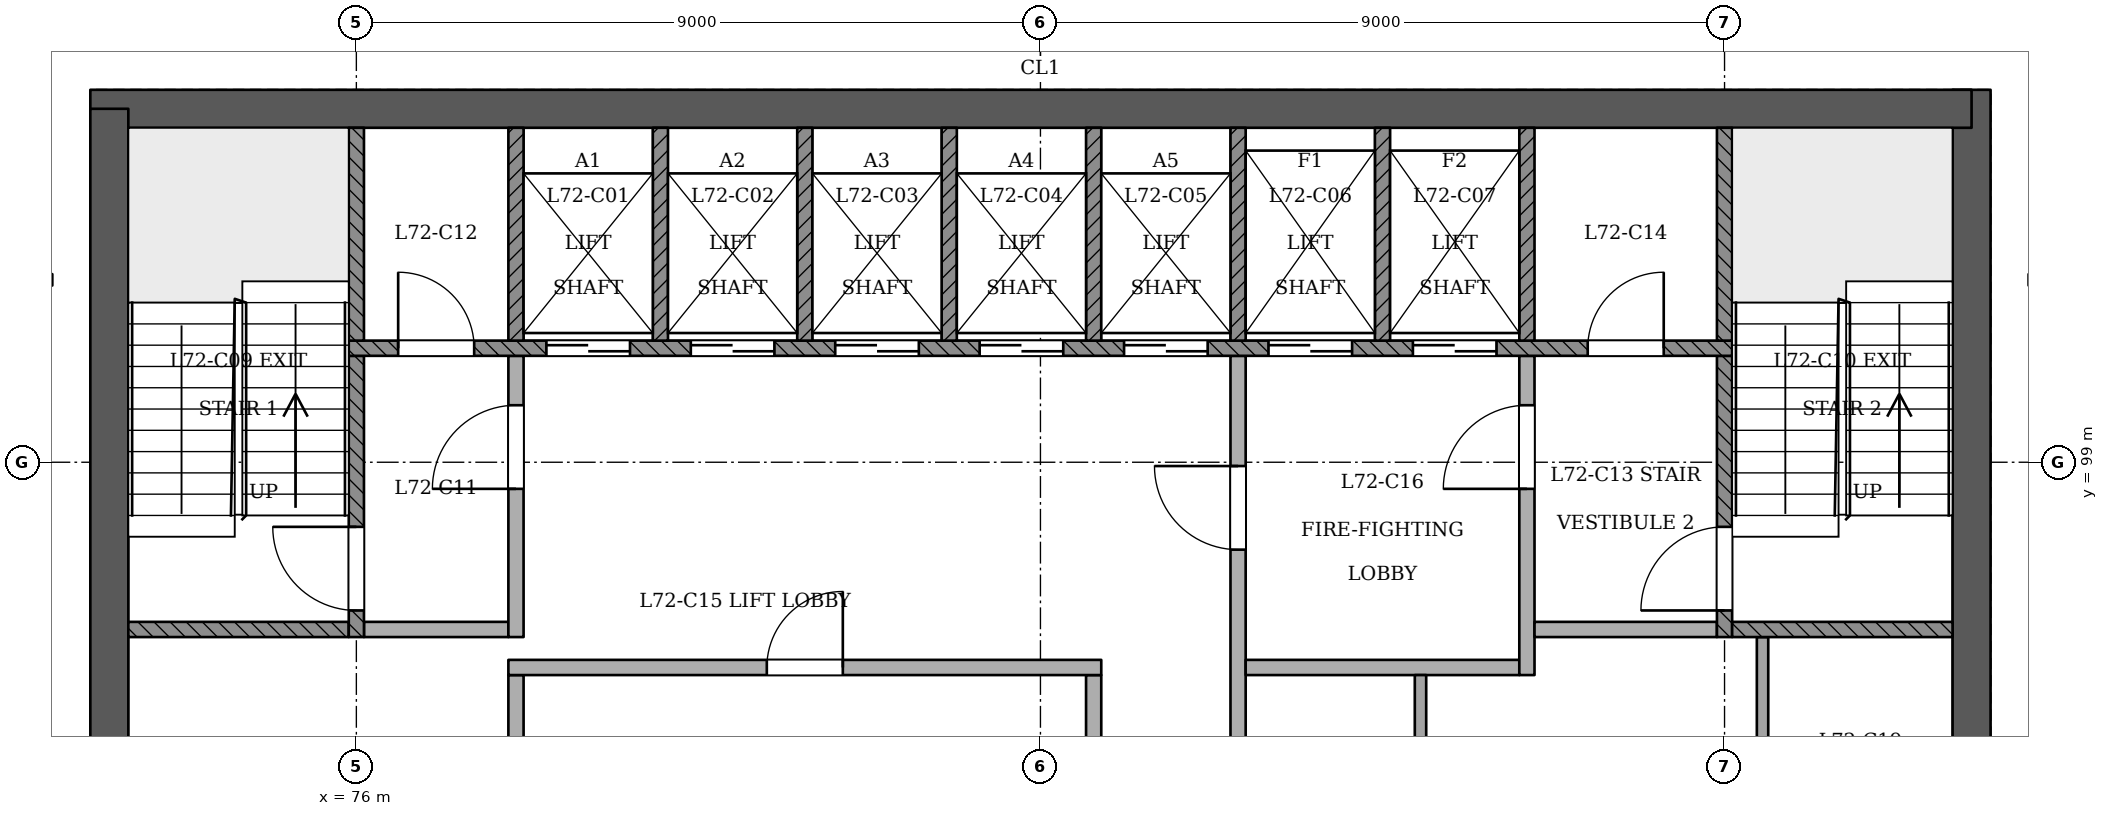
"""IFC4 building model, lengths in metres.
Left out: names, types, materials, properties, quantities, classifications, styles, units other than length and angle.
Written with IfcOpenShell. Run it as: python <this file> out.ifc"""

import sys

from ifc_helpers import new_model, si_unit, direction, frame, frame_2d, origin, place, context, subcontext, project, spatial, rectangle, extrude, element, fill, save


model = new_model("IFC4")
c1 = context("Model", 3, precision=1e-05, world=origin(), true_north=direction((0.0, 1.0)))
c2 = subcontext(c1, "Body", "Model", "MODEL_VIEW")
j1 = project(units=[si_unit("LENGTHUNIT", "METRE"), si_unit("PLANEANGLEUNIT", "RADIAN")], contexts=[c1])
p1 = place(None, origin())
s1 = spatial("IfcSite", under=j1, at=p1, CompositionType="ELEMENT")
p2 = place(p1, origin())
s2 = spatial("IfcBuilding", under=s1, at=p2, CompositionType="ELEMENT")
p3 = place(p2, frame((0.0, 0.0, 278.8)))
s3 = spatial("IfcBuildingStorey", under=s2, at=p3, CompositionType="ELEMENT", Elevation=278.8)
p4 = place(p3, frame((97.25, 93.15, 0.0), z_axis=(0.0, 0.0, 1.0), x_axis=(0.0, 1.0, 0.0)))
e1 = element("IfcWall", 1, at=p4, inside=s3, PredefinedType="SHEAR", context=c2, shape_type="SweptSolid", body=[
    extrude(rectangle(XDim=10.75, YDim=0.5, at=frame_2d((5.375, 0.0))), origin(), (0.0, 0.0, 1.0), 3.6),
])
p5 = place(p3, frame((97.25, 103.65, 0.0), z_axis=(0.0, 0.0, 1.0), x_axis=(-1.0, 0.0, 0.0)))
e2 = element("IfcWall", 2, at=p5, inside=s3, PredefinedType="SHEAR", context=c2, shape_type="SweptSolid", body=[
    extrude(rectangle(XDim=24.75, YDim=0.5, at=frame_2d((12.375, 0.0))), origin(), (0.0, 0.0, 1.0), 3.6),
])
p6 = place(p3, frame((72.75, 103.65, 0.0), z_axis=(0.0, 0.0, 1.0), x_axis=(0.0, -1.0, 0.0)))
e3 = element("IfcWall", 3, at=p6, inside=s3, PredefinedType="SHEAR", context=c2, shape_type="SweptSolid", body=[
    extrude(rectangle(XDim=10.75, YDim=0.5, at=frame_2d((5.375, 0.0))), origin(), (0.0, 0.0, 1.0), 3.6),
])
p7 = place(p3, frame((72.0, 101.4, 0.0), z_axis=(0.0, 0.0, 1.0), x_axis=(-1.0, 0.0, 0.0)))
e4 = element("IfcWall", 4, at=p7, inside=s3, PredefinedType="PARTITIONING", context=c2, shape_type="SweptSolid", body=[
    extrude(rectangle(XDim=1.8, YDim=0.15, at=frame_2d((0.9, 0.0))), origin(), (0.0, 0.0, 1.0), 3.2),
])
p8 = place(p7, frame((0.504, 0.0, 0.0)))
e5 = element("IfcOpeningElement", 5, at=p8, cuts=e4, PredefinedType="OPENING", context=c2, shape_type="SweptSolid", body=[
    extrude(rectangle(XDim=1.0, YDim=2.1, at=frame_2d((0.5, 1.05))), frame((0.0, 0.085, 0.0), z_axis=(0.0, -1.0, 0.0), x_axis=(1.0, 0.0, 0.0)), (0.0, 0.0, 1.0), 0.171),
])
for number, where, z_axis, x_axis in (
    (6, (78.1, 93.4, 0.0), (0.0, 0.0, 1.0), (0.0, 1.0, 0.0)),
    (7, (85.7, 93.4, 0.0), (0.0, 0.0, 1.0), (0.0, 1.0, 0.0)),
):
    element("IfcWall", number, at=place(p3, frame(where, z_axis=z_axis, x_axis=x_axis)), inside=s3, PredefinedType="PARTITIONING", context=c2, shape_type="SweptSolid", body=[
        extrude(rectangle(XDim=2.8, YDim=0.2, at=frame_2d((1.4, 0.0))), origin(), (0.0, 0.0, 1.0), 3.2),
    ])
p9 = place(p3, frame((87.6, 93.4, 0.0), z_axis=(0.0, 0.0, 1.0), x_axis=(0.0, 1.0, 0.0)))
e8 = element("IfcWall", 8, at=p9, inside=s3, PredefinedType="PARTITIONING", context=c2, shape_type="SweptSolid", body=[
    extrude(rectangle(XDim=7.0, YDim=0.2, at=frame_2d((3.5, 0.0))), origin(), (0.0, 0.0, 1.0), 3.2),
])
p10 = place(p9, frame((4.45, 0.0, 0.0)))
e9 = element("IfcOpeningElement", 9, at=p10, cuts=e8, PredefinedType="OPENING", context=c2, shape_type="SweptSolid", body=[
    extrude(rectangle(XDim=1.1, YDim=2.1, at=frame_2d((0.55, 1.05))), frame((0.0, 0.11, 0.0), z_axis=(0.0, -1.0, 0.0), x_axis=(1.0, 0.0, 0.0)), (0.0, 0.0, 1.0), 0.221),
])
p11 = place(p3, frame((90.0, 93.4, 0.0), z_axis=(0.0, 0.0, 1.0), x_axis=(0.0, 1.0, 0.0)))
e10 = element("IfcWall", 10, at=p11, inside=s3, PredefinedType="PARTITIONING", context=c2, shape_type="SweptSolid", body=[
    extrude(rectangle(XDim=2.8, YDim=0.15, at=frame_2d((1.4, 0.0))), origin(), (0.0, 0.0, 1.0), 3.2),
])
p12 = place(p3, frame((94.5, 93.4, 0.0), z_axis=(0.0, 0.0, 1.0), x_axis=(0.0, 1.0, 0.0)))
e11 = element("IfcWall", 11, at=p12, inside=s3, PredefinedType="PARTITIONING", context=c2, shape_type="SweptSolid", body=[
    extrude(rectangle(XDim=3.3, YDim=0.15, at=frame_2d((1.65, 0.0))), origin(), (0.0, 0.0, 1.0), 3.2),
])
p13 = place(p3, frame((78.0, 96.3, 0.0), z_axis=(0.0, 0.0, 1.0), x_axis=(1.0, 0.0, 0.0)))
e12 = element("IfcWall", 12, at=p13, inside=s3, PredefinedType="PARTITIONING", context=c2, shape_type="SweptSolid", body=[
    extrude(rectangle(XDim=7.8, YDim=0.2, at=frame_2d((3.9, 0.0))), origin(), (0.0, 0.0, 1.0), 3.2),
])
p14 = place(p13, frame((3.4, 0.0, 0.0)))
e13 = element("IfcOpeningElement", 13, at=p14, cuts=e12, PredefinedType="OPENING", context=c2, shape_type="SweptSolid", body=[
    extrude(rectangle(XDim=1.0, YDim=2.1, at=frame_2d((0.5, 1.05))), frame((0.0, 0.11, 0.0), z_axis=(0.0, -1.0, 0.0), x_axis=(1.0, 0.0, 0.0)), (0.0, 0.0, 1.0), 0.221),
])
p15 = place(p3, frame((87.7, 96.3, 0.0), z_axis=(0.0, 0.0, 1.0), x_axis=(1.0, 0.0, 0.0)))
e14 = element("IfcWall", 14, at=p15, inside=s3, PredefinedType="PARTITIONING", context=c2, shape_type="SweptSolid", body=[
    extrude(rectangle(XDim=3.6, YDim=0.2, at=frame_2d((1.8, 0.0))), origin(), (0.0, 0.0, 1.0), 3.2),
])
p16 = place(p3, frame((91.4, 96.2, 0.0), z_axis=(0.0, 0.0, 1.0), x_axis=(0.0, 1.0, 0.0)))
e15 = element("IfcWall", 15, at=p16, inside=s3, PredefinedType="PARTITIONING", context=c2, shape_type="SweptSolid", body=[
    extrude(rectangle(XDim=4.2, YDim=0.2, at=frame_2d((2.1, 0.0))), origin(), (0.0, 0.0, 1.0), 3.2),
])
p17 = place(p16, frame((2.45, 0.0, 0.0)))
e16 = element("IfcOpeningElement", 16, at=p17, cuts=e15, PredefinedType="OPENING", context=c2, shape_type="SweptSolid", body=[
    extrude(rectangle(XDim=1.1, YDim=2.1, at=frame_2d((0.55, 1.05))), frame((0.0, 0.11, 0.0), z_axis=(0.0, -1.0, 0.0), x_axis=(1.0, 0.0, 0.0)), (0.0, 0.0, 1.0), 0.221),
])
p18 = place(p3, frame((73.0, 96.8, 0.0), z_axis=(0.0, 0.0, 1.0), x_axis=(1.0, 0.0, 0.0)))
e17 = element("IfcWall", 17, at=p18, inside=s3, PredefinedType="SOLIDWALL", context=c2, shape_type="SweptSolid", body=[
    extrude(rectangle(XDim=2.9, YDim=0.2, at=frame_2d((1.45, 0.0))), origin(), (0.0, 0.0, 1.0), 3.2),
])
p19 = place(p3, frame((76.0, 96.7, 0.0), z_axis=(0.0, 0.0, 1.0), x_axis=(0.0, 1.0, 0.0)))
e18 = element("IfcWall", 18, at=p19, inside=s3, PredefinedType="SOLIDWALL", context=c2, shape_type="SweptSolid", body=[
    extrude(rectangle(XDim=3.7, YDim=0.2, at=frame_2d((1.85, 0.0))), origin(), (0.0, 0.0, 1.0), 3.2),
])
p20 = place(p19, frame((0.35, 0.0, 0.0)))
e19 = element("IfcOpeningElement", 19, at=p20, cuts=e18, PredefinedType="OPENING", context=c2, shape_type="SweptSolid", body=[
    extrude(rectangle(XDim=1.1, YDim=2.1, at=frame_2d((0.55, 1.05))), frame((0.0, 0.11, 0.0), z_axis=(0.0, -1.0, 0.0), x_axis=(1.0, 0.0, 0.0)), (0.0, 0.0, 1.0), 0.221),
])
p21 = place(p3, frame((76.1, 96.8, 0.0), z_axis=(0.0, 0.0, 1.0), x_axis=(1.0, 0.0, 0.0)))
e20 = element("IfcWall", 20, at=p21, inside=s3, PredefinedType="PARTITIONING", context=c2, shape_type="SweptSolid", body=[
    extrude(rectangle(XDim=1.9, YDim=0.2, at=frame_2d((0.95, 0.0))), origin(), (0.0, 0.0, 1.0), 3.2),
])
p22 = place(p3, frame((78.1, 96.7, 0.0), z_axis=(0.0, 0.0, 1.0), x_axis=(0.0, 1.0, 0.0)))
e21 = element("IfcWall", 21, at=p22, inside=s3, PredefinedType="PARTITIONING", context=c2, shape_type="SweptSolid", body=[
    extrude(rectangle(XDim=3.7, YDim=0.2, at=frame_2d((1.85, 0.0))), origin(), (0.0, 0.0, 1.0), 3.2),
])
p23 = place(p22, frame((1.95, 0.0, 0.0)))
e22 = element("IfcOpeningElement", 22, at=p23, cuts=e21, PredefinedType="OPENING", context=c2, shape_type="SweptSolid", body=[
    extrude(rectangle(XDim=1.1, YDim=2.1, at=frame_2d((0.55, 1.05))), frame((0.0, 0.11, 0.0), z_axis=(0.0, -1.0, 0.0), x_axis=(1.0, 0.0, 0.0)), (0.0, 0.0, 1.0), 0.221),
])
p24 = place(p3, frame((91.5, 96.8, 0.0), z_axis=(0.0, 0.0, 1.0), x_axis=(1.0, 0.0, 0.0)))
e23 = element("IfcWall", 23, at=p24, inside=s3, PredefinedType="PARTITIONING", context=c2, shape_type="SweptSolid", body=[
    extrude(rectangle(XDim=2.4, YDim=0.2, at=frame_2d((1.2, 0.0))), origin(), (0.0, 0.0, 1.0), 3.2),
])
p25 = place(p3, frame((94.0, 96.7, 0.0), z_axis=(0.0, 0.0, 1.0), x_axis=(0.0, 1.0, 0.0)))
e24 = element("IfcWall", 24, at=p25, inside=s3, PredefinedType="SOLIDWALL", context=c2, shape_type="SweptSolid", body=[
    extrude(rectangle(XDim=3.7, YDim=0.2, at=frame_2d((1.85, 0.0))), origin(), (0.0, 0.0, 1.0), 3.2),
])
p26 = place(p25, frame((0.35, 0.0, 0.0)))
e25 = element("IfcOpeningElement", 25, at=p26, cuts=e24, PredefinedType="OPENING", context=c2, shape_type="SweptSolid", body=[
    extrude(rectangle(XDim=1.1, YDim=2.1, at=frame_2d((0.55, 1.05))), frame((0.0, 0.11, 0.0), z_axis=(0.0, -1.0, 0.0), x_axis=(1.0, 0.0, 0.0)), (0.0, 0.0, 1.0), 0.221),
])
p27 = place(p3, frame((94.1, 96.8, 0.0), z_axis=(0.0, 0.0, 1.0), x_axis=(1.0, 0.0, 0.0)))
e26 = element("IfcWall", 26, at=p27, inside=s3, PredefinedType="SOLIDWALL", context=c2, shape_type="SweptSolid", body=[
    extrude(rectangle(XDim=2.9, YDim=0.2, at=frame_2d((1.45, 0.0))), origin(), (0.0, 0.0, 1.0), 3.2),
])
p28 = place(p3, frame((75.9, 100.5, 0.0), z_axis=(0.0, 0.0, 1.0), x_axis=(1.0, 0.0, 0.0)))
e27 = element("IfcWall", 27, at=p28, inside=s3, PredefinedType="SOLIDWALL", context=c2, shape_type="SweptSolid", body=[
    extrude(rectangle(XDim=18.2, YDim=0.2, at=frame_2d((9.1, 0.0))), origin(), (0.0, 0.0, 1.0), 3.2),
])
p29 = place(p28, frame((2.6, 0.0, 0.0)))
e28 = element("IfcOpeningElement", 28, at=p29, cuts=e27, PredefinedType="OPENING", context=c2, shape_type="SweptSolid", body=[
    extrude(rectangle(XDim=1.1, YDim=2.1, at=frame_2d((0.55, 1.05))), frame((0.0, 0.11, 0.0), z_axis=(0.0, -1.0, 0.0), x_axis=(1.0, 0.0, 0.0)), (0.0, 0.0, 1.0), 0.221),
])
p30 = place(p28, frame((4.5, 0.0, 0.0)))
e29 = element("IfcOpeningElement", 29, at=p30, cuts=e27, PredefinedType="OPENING", context=c2, shape_type="SweptSolid", body=[
    extrude(rectangle(XDim=1.1, YDim=2.1, at=frame_2d((0.55, 1.05))), frame((0.0, 0.11, 0.0), z_axis=(0.0, -1.0, 0.0), x_axis=(1.0, 0.0, 0.0)), (0.0, 0.0, 1.0), 0.221),
])
p31 = place(p28, frame((6.4, 0.0, 0.0)))
e30 = element("IfcOpeningElement", 30, at=p31, cuts=e27, PredefinedType="OPENING", context=c2, shape_type="SweptSolid", body=[
    extrude(rectangle(XDim=1.1, YDim=2.1, at=frame_2d((0.55, 1.05))), frame((0.0, 0.11, 0.0), z_axis=(0.0, -1.0, 0.0), x_axis=(1.0, 0.0, 0.0)), (0.0, 0.0, 1.0), 0.221),
])
p32 = place(p28, frame((8.3, 0.0, 0.0)))
e31 = element("IfcOpeningElement", 31, at=p32, cuts=e27, PredefinedType="OPENING", context=c2, shape_type="SweptSolid", body=[
    extrude(rectangle(XDim=1.1, YDim=2.1, at=frame_2d((0.55, 1.05))), frame((0.0, 0.11, 0.0), z_axis=(0.0, -1.0, 0.0), x_axis=(1.0, 0.0, 0.0)), (0.0, 0.0, 1.0), 0.221),
])
p33 = place(p28, frame((10.2, 0.0, 0.0)))
e32 = element("IfcOpeningElement", 32, at=p33, cuts=e27, PredefinedType="OPENING", context=c2, shape_type="SweptSolid", body=[
    extrude(rectangle(XDim=1.1, YDim=2.1, at=frame_2d((0.55, 1.05))), frame((0.0, 0.11, 0.0), z_axis=(0.0, -1.0, 0.0), x_axis=(1.0, 0.0, 0.0)), (0.0, 0.0, 1.0), 0.221),
])
p34 = place(p28, frame((12.1, 0.0, 0.0)))
e33 = element("IfcOpeningElement", 33, at=p34, cuts=e27, PredefinedType="OPENING", context=c2, shape_type="SweptSolid", body=[
    extrude(rectangle(XDim=1.1, YDim=2.1, at=frame_2d((0.55, 1.05))), frame((0.0, 0.11, 0.0), z_axis=(0.0, -1.0, 0.0), x_axis=(1.0, 0.0, 0.0)), (0.0, 0.0, 1.0), 0.221),
])
p35 = place(p28, frame((14.0, 0.0, 0.0)))
e34 = element("IfcOpeningElement", 34, at=p35, cuts=e27, PredefinedType="OPENING", context=c2, shape_type="SweptSolid", body=[
    extrude(rectangle(XDim=1.1, YDim=2.1, at=frame_2d((0.55, 1.05))), frame((0.0, 0.11, 0.0), z_axis=(0.0, -1.0, 0.0), x_axis=(1.0, 0.0, 0.0)), (0.0, 0.0, 1.0), 0.221),
])
p36 = place(p28, frame((0.65, 0.0, 0.0)))
e35 = element("IfcOpeningElement", 35, at=p36, cuts=e27, PredefinedType="OPENING", context=c2, shape_type="SweptSolid", body=[
    extrude(rectangle(XDim=1.0, YDim=2.1, at=frame_2d((0.5, 1.05))), frame((0.0, 0.11, 0.0), z_axis=(0.0, -1.0, 0.0), x_axis=(1.0, 0.0, 0.0)), (0.0, 0.0, 1.0), 0.221),
])
p37 = place(p28, frame((16.3, 0.0, 0.0)))
e36 = element("IfcOpeningElement", 36, at=p37, cuts=e27, PredefinedType="OPENING", context=c2, shape_type="SweptSolid", body=[
    extrude(rectangle(XDim=1.0, YDim=2.1, at=frame_2d((0.5, 1.05))), frame((0.0, 0.11, 0.0), z_axis=(0.0, -1.0, 0.0), x_axis=(1.0, 0.0, 0.0)), (0.0, 0.0, 1.0), 0.221),
])
for number, where, z_axis, x_axis in (
    (37, (76.0, 100.6, 0.0), (0.0, 0.0, 1.0), (0.0, 1.0, 0.0)),
    (38, (78.1, 100.6, 0.0), (0.0, 0.0, 1.0), (0.0, 1.0, 0.0)),
    (39, (80.0, 100.6, 0.0), (0.0, 0.0, 1.0), (0.0, 1.0, 0.0)),
    (40, (81.9, 100.6, 0.0), (0.0, 0.0, 1.0), (0.0, 1.0, 0.0)),
    (41, (83.8, 100.6, 0.0), (0.0, 0.0, 1.0), (0.0, 1.0, 0.0)),
    (42, (85.7, 100.6, 0.0), (0.0, 0.0, 1.0), (0.0, 1.0, 0.0)),
    (43, (87.6, 100.6, 0.0), (0.0, 0.0, 1.0), (0.0, 1.0, 0.0)),
    (44, (89.5, 100.6, 0.0), (0.0, 0.0, 1.0), (0.0, 1.0, 0.0)),
    (45, (91.4, 100.6, 0.0), (0.0, 0.0, 1.0), (0.0, 1.0, 0.0)),
    (46, (94.0, 100.6, 0.0), (0.0, 0.0, 1.0), (0.0, 1.0, 0.0)),
):
    element("IfcWall", number, at=place(p3, frame(where, z_axis=z_axis, x_axis=x_axis)), inside=s3, PredefinedType="SOLIDWALL", context=c2, shape_type="SweptSolid", body=[
        extrude(rectangle(XDim=2.8, YDim=0.2, at=frame_2d((1.4, 0.0))), origin(), (0.0, 0.0, 1.0), 3.2),
    ])
p38 = place(p29, origin())
e47 = element("IfcDoor", 47, at=p38, inside=s3, OperationType="SLIDING_TO_RIGHT", PredefinedType="NOTDEFINED", context=c2, shape_type="SweptSolid", body=[
    extrude(rectangle(XDim=1.1, YDim=2.1, at=frame_2d((0.55, 1.05))), frame((0.0, 0.025, 0.0), z_axis=(0.0, -1.0, 0.0), x_axis=(1.0, 0.0, 0.0)), (0.0, 0.0, 1.0), 0.05),
])
fill(e28, e47)
p39 = place(p30, origin())
e48 = element("IfcDoor", 48, at=p39, inside=s3, OperationType="SLIDING_TO_LEFT", PredefinedType="NOTDEFINED", context=c2, shape_type="SweptSolid", body=[
    extrude(rectangle(XDim=1.1, YDim=2.1, at=frame_2d((0.55, 1.05))), frame((0.0, 0.025, 0.0), z_axis=(0.0, -1.0, 0.0), x_axis=(1.0, 0.0, 0.0)), (0.0, 0.0, 1.0), 0.05),
])
fill(e29, e48)
p40 = place(p31, origin())
e49 = element("IfcDoor", 49, at=p40, inside=s3, OperationType="SLIDING_TO_RIGHT", PredefinedType="NOTDEFINED", context=c2, shape_type="SweptSolid", body=[
    extrude(rectangle(XDim=1.1, YDim=2.1, at=frame_2d((0.55, 1.05))), frame((0.0, 0.025, 0.0), z_axis=(0.0, -1.0, 0.0), x_axis=(1.0, 0.0, 0.0)), (0.0, 0.0, 1.0), 0.05),
])
fill(e30, e49)
p41 = place(p32, origin())
e50 = element("IfcDoor", 50, at=p41, inside=s3, OperationType="SLIDING_TO_LEFT", PredefinedType="NOTDEFINED", context=c2, shape_type="SweptSolid", body=[
    extrude(rectangle(XDim=1.1, YDim=2.1, at=frame_2d((0.55, 1.05))), frame((0.0, 0.025, 0.0), z_axis=(0.0, -1.0, 0.0), x_axis=(1.0, 0.0, 0.0)), (0.0, 0.0, 1.0), 0.05),
])
fill(e31, e50)
p42 = place(p33, origin())
e51 = element("IfcDoor", 51, at=p42, inside=s3, OperationType="SLIDING_TO_RIGHT", PredefinedType="NOTDEFINED", context=c2, shape_type="SweptSolid", body=[
    extrude(rectangle(XDim=1.1, YDim=2.1, at=frame_2d((0.55, 1.05))), frame((0.0, 0.025, 0.0), z_axis=(0.0, -1.0, 0.0), x_axis=(1.0, 0.0, 0.0)), (0.0, 0.0, 1.0), 0.05),
])
fill(e32, e51)
p43 = place(p34, origin())
e52 = element("IfcDoor", 52, at=p43, inside=s3, OperationType="SLIDING_TO_RIGHT", PredefinedType="NOTDEFINED", context=c2, shape_type="SweptSolid", body=[
    extrude(rectangle(XDim=1.1, YDim=2.1, at=frame_2d((0.55, 1.05))), frame((0.0, 0.025, 0.0), z_axis=(0.0, -1.0, 0.0), x_axis=(1.0, 0.0, 0.0)), (0.0, 0.0, 1.0), 0.05),
])
fill(e33, e52)
p44 = place(p35, origin())
e53 = element("IfcDoor", 53, at=p44, inside=s3, OperationType="SLIDING_TO_LEFT", PredefinedType="NOTDEFINED", context=c2, shape_type="SweptSolid", body=[
    extrude(rectangle(XDim=1.1, YDim=2.1, at=frame_2d((0.55, 1.05))), frame((0.0, 0.025, 0.0), z_axis=(0.0, -1.0, 0.0), x_axis=(1.0, 0.0, 0.0)), (0.0, 0.0, 1.0), 0.05),
])
fill(e34, e53)
p45 = place(p20, origin())
e54 = element("IfcDoor", 54, at=p45, inside=s3, OperationType="SINGLE_SWING_RIGHT", PredefinedType="NOTDEFINED", context=c2, shape_type="SweptSolid", body=[
    extrude(rectangle(XDim=1.1, YDim=2.1, at=frame_2d((0.55, 1.05))), frame((0.0, 0.025, 0.0), z_axis=(0.0, -1.0, 0.0), x_axis=(1.0, 0.0, 0.0)), (0.0, 0.0, 1.0), 0.05),
])
fill(e19, e54)
p46 = place(p26, origin())
e55 = element("IfcDoor", 55, at=p46, inside=s3, OperationType="SINGLE_SWING_LEFT", PredefinedType="NOTDEFINED", context=c2, shape_type="SweptSolid", body=[
    extrude(rectangle(XDim=1.1, YDim=2.1, at=frame_2d((0.55, 1.05))), frame((0.0, 0.025, 0.0), z_axis=(0.0, -1.0, 0.0), x_axis=(1.0, 0.0, 0.0)), (0.0, 0.0, 1.0), 0.05),
])
fill(e25, e55)
p47 = place(p23, origin())
e56 = element("IfcDoor", 56, at=p47, inside=s3, OperationType="SINGLE_SWING_LEFT", PredefinedType="NOTDEFINED", context=c2, shape_type="SweptSolid", body=[
    extrude(rectangle(XDim=1.1, YDim=2.1, at=frame_2d((0.55, 1.05))), frame((0.0, 0.025, 0.0), z_axis=(0.0, -1.0, 0.0), x_axis=(1.0, 0.0, 0.0)), (0.0, 0.0, 1.0), 0.05),
])
fill(e22, e56)
p48 = place(p10, origin())
e57 = element("IfcDoor", 57, at=p48, inside=s3, OperationType="SINGLE_SWING_RIGHT", PredefinedType="NOTDEFINED", context=c2, shape_type="SweptSolid", body=[
    extrude(rectangle(XDim=1.1, YDim=2.1, at=frame_2d((0.55, 1.05))), frame((0.0, 0.025, 0.0), z_axis=(0.0, -1.0, 0.0), x_axis=(1.0, 0.0, 0.0)), (0.0, 0.0, 1.0), 0.05),
])
fill(e9, e57)
p49 = place(p17, origin())
e58 = element("IfcDoor", 58, at=p49, inside=s3, OperationType="SINGLE_SWING_LEFT", PredefinedType="NOTDEFINED", context=c2, shape_type="SweptSolid", body=[
    extrude(rectangle(XDim=1.1, YDim=2.1, at=frame_2d((0.55, 1.05))), frame((0.0, 0.025, 0.0), z_axis=(0.0, -1.0, 0.0), x_axis=(1.0, 0.0, 0.0)), (0.0, 0.0, 1.0), 0.05),
])
fill(e16, e58)
p50 = place(p36, origin())
e59 = element("IfcDoor", 59, at=p50, inside=s3, OperationType="SINGLE_SWING_LEFT", PredefinedType="NOTDEFINED", context=c2, shape_type="SweptSolid", body=[
    extrude(rectangle(XDim=1.0, YDim=2.1, at=frame_2d((0.5, 1.05))), frame((0.0, 0.025, 0.0), z_axis=(0.0, -1.0, 0.0), x_axis=(1.0, 0.0, 0.0)), (0.0, 0.0, 1.0), 0.05),
])
fill(e35, e59)
p51 = place(p37, origin())
e60 = element("IfcDoor", 60, at=p51, inside=s3, OperationType="SINGLE_SWING_RIGHT", PredefinedType="NOTDEFINED", context=c2, shape_type="SweptSolid", body=[
    extrude(rectangle(XDim=1.0, YDim=2.1, at=frame_2d((0.5, 1.05))), frame((0.0, 0.025, 0.0), z_axis=(0.0, -1.0, 0.0), x_axis=(1.0, 0.0, 0.0)), (0.0, 0.0, 1.0), 0.05),
])
fill(e36, e60)
p52 = place(p14, origin())
e61 = element("IfcDoor", 61, at=p52, inside=s3, OperationType="SINGLE_SWING_RIGHT", PredefinedType="NOTDEFINED", context=c2, shape_type="SweptSolid", body=[
    extrude(rectangle(XDim=1.0, YDim=2.1, at=frame_2d((0.5, 1.05))), frame((0.0, 0.025, 0.0), z_axis=(0.0, -1.0, 0.0), x_axis=(1.0, 0.0, 0.0)), (0.0, 0.0, 1.0), 0.05),
])
fill(e13, e61)
save(model, sys.argv[1])
